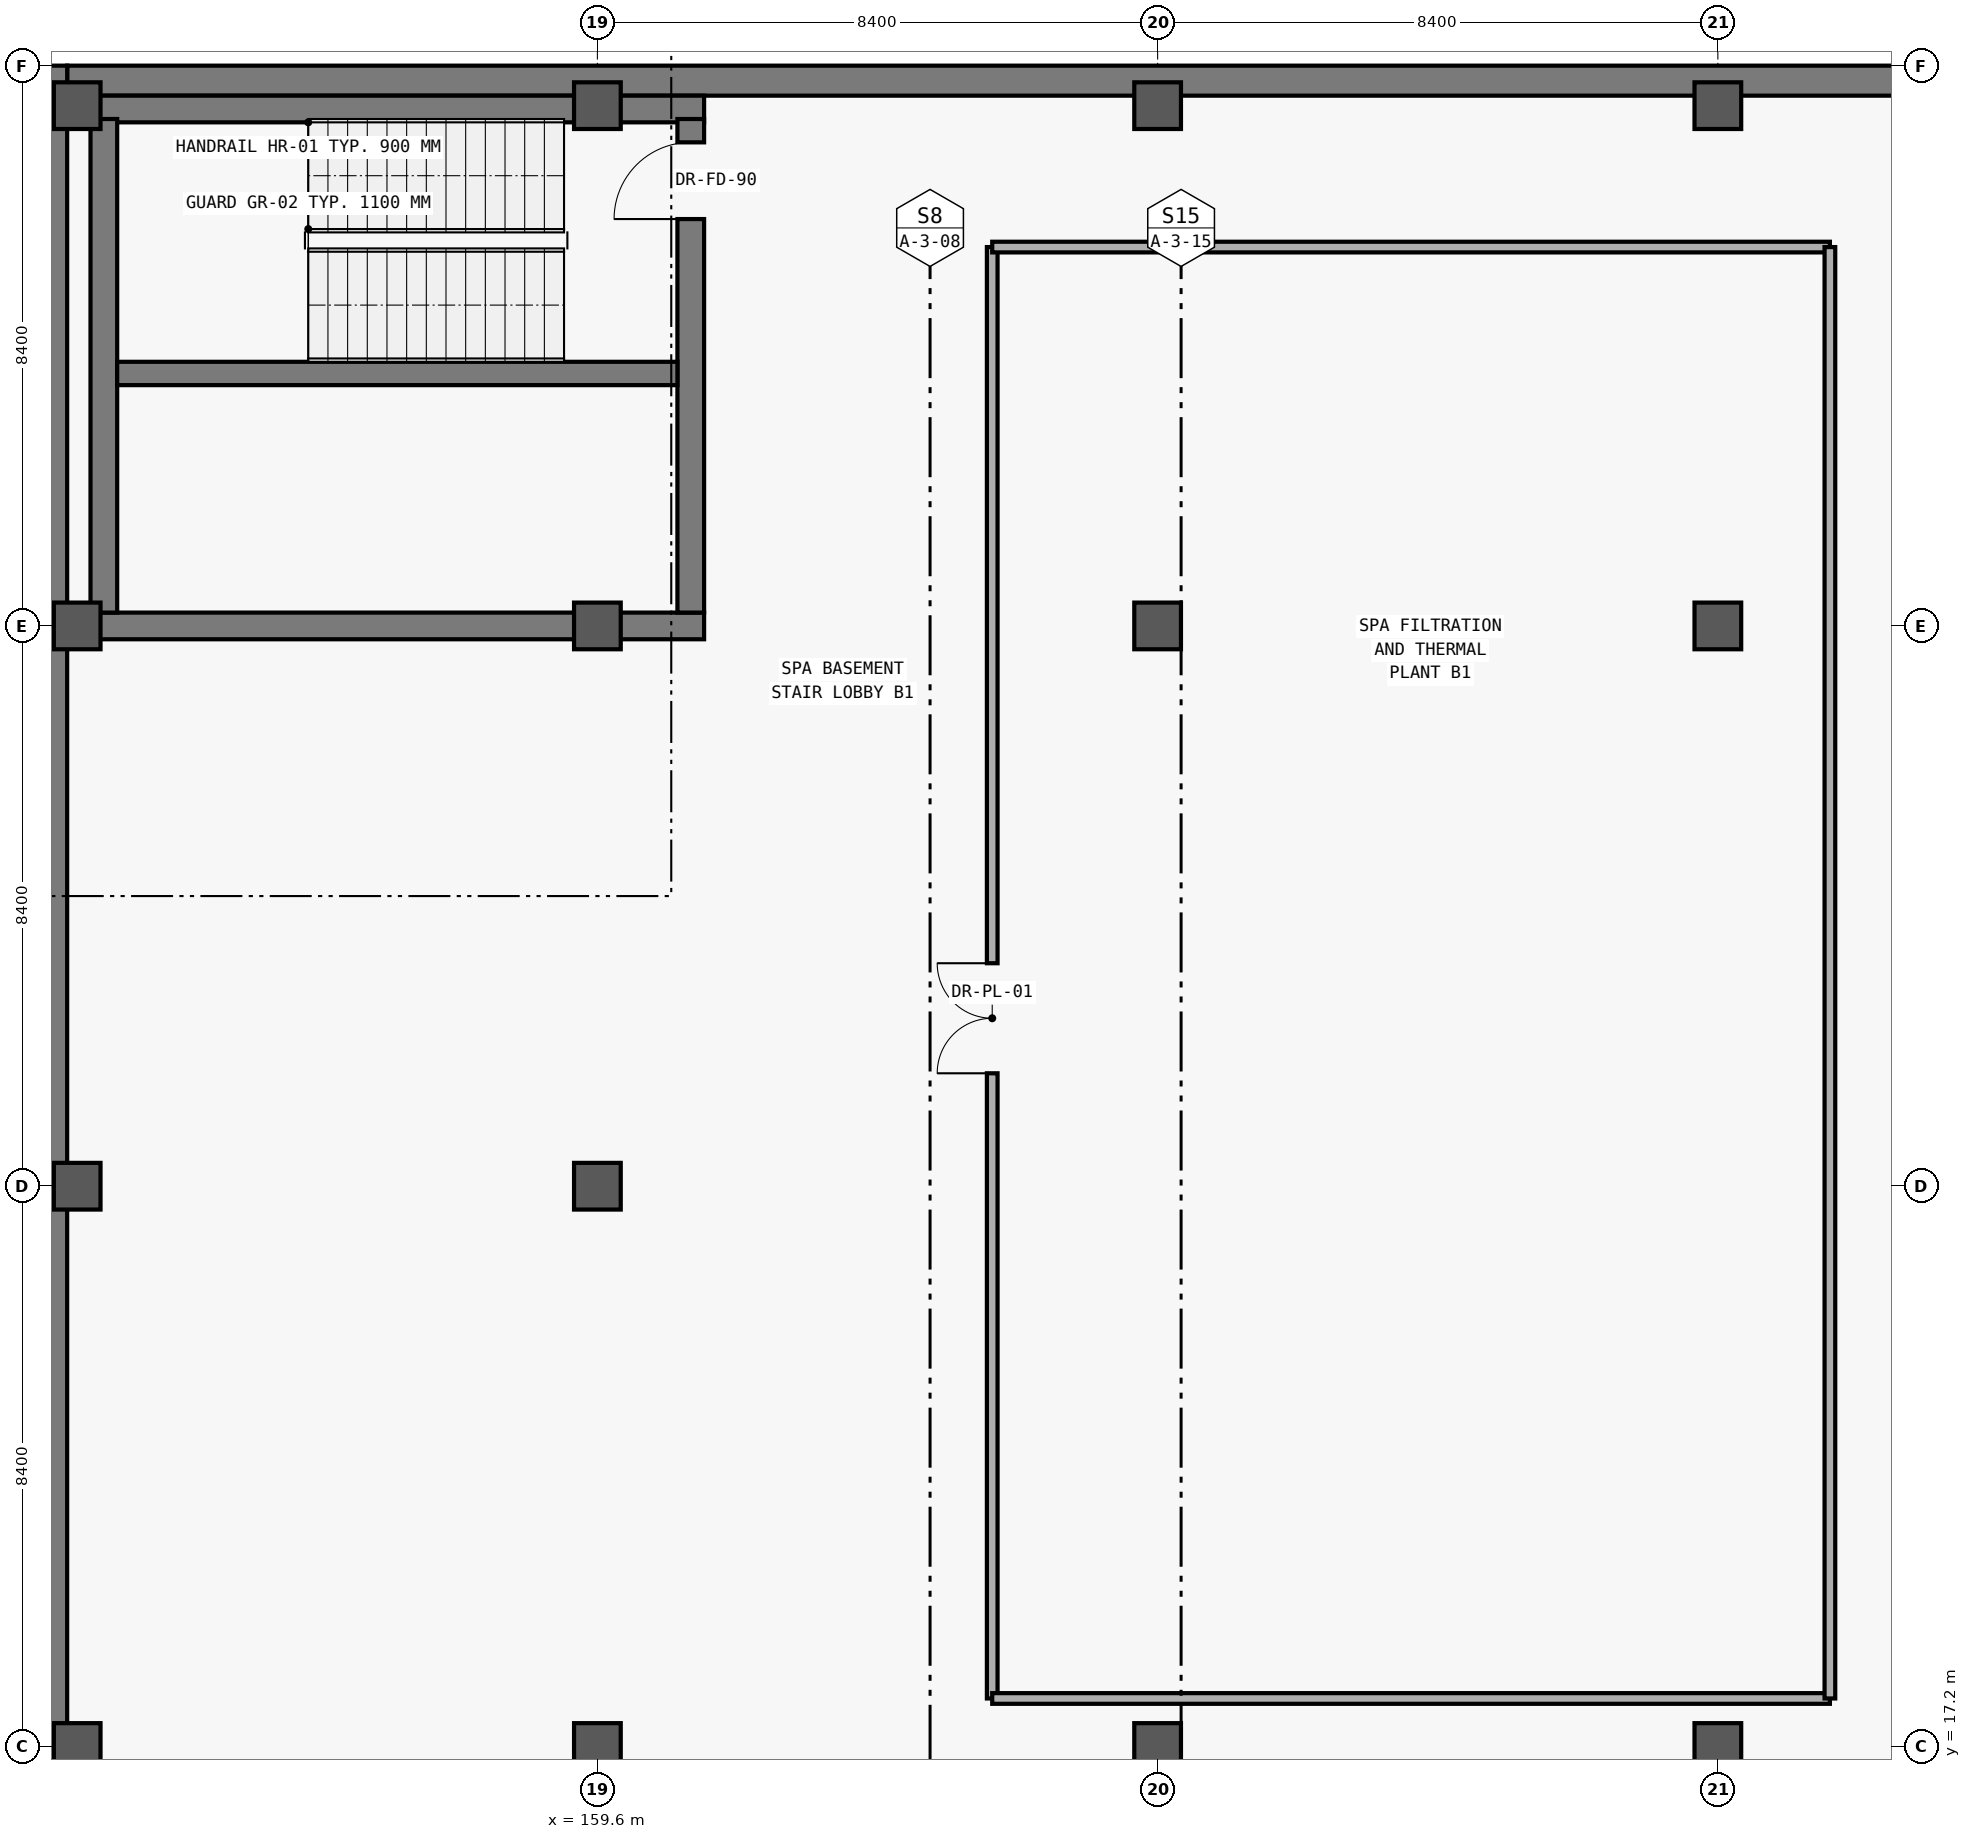
"""IFC4 building model, lengths in metres.
Left out: names, types, materials, properties, quantities, classifications, styles, units other than length and angle.
Written with IfcOpenShell. Run it as: python <this file> out.ifc"""

import sys

from ifc_helpers import new_model, si_unit, direction, frame, frame_2d, origin, origin_2d, place, context, subcontext, project, spatial, rectangle, extrude, element, fill, save


model = new_model("IFC4")
c1 = context("Model", 3, precision=1e-05, world=origin(), true_north=direction((0.0, 1.0)))
c2 = subcontext(c1, "Body", "Model", "MODEL_VIEW")
j1 = project(units=[si_unit("LENGTHUNIT", "METRE"), si_unit("PLANEANGLEUNIT", "RADIAN")], contexts=[c1])
p1 = place(None, origin())
s1 = spatial("IfcSite", under=j1, at=p1, CompositionType="ELEMENT")
p2 = place(p1, origin())
s2 = spatial("IfcBuilding", under=s1, at=p2, CompositionType="ELEMENT")
p3 = place(p2, frame((0.0, 0.0, -4.8)))
s3 = spatial("IfcBuildingStorey", under=s2, at=p3, CompositionType="ELEMENT", Elevation=-4.8)
p4 = place(p3, frame((151.65, 42.175, 0.0), z_axis=(0.0, 0.0, 1.0), x_axis=(1.0, 0.0, 0.0)))
e1 = element("IfcWall", 1, at=p4, inside=s3, PredefinedType="USERDEFINED", context=c2, shape_type="SweptSolid", body=[
    extrude(rectangle(XDim=41.1, YDim=0.45, at=frame_2d((20.55, 0.0))), origin(), (0.0, 0.0, 1.0), 4.48),
])
p5 = place(p3, frame((151.425, 6.0, 0.0), z_axis=(0.0, 0.0, 1.0), x_axis=(0.0, 1.0, 0.0)))
e2 = element("IfcWall", 2, at=p5, inside=s3, PredefinedType="USERDEFINED", context=c2, shape_type="SweptSolid", body=[
    extrude(rectangle(XDim=36.4, YDim=0.45, at=frame_2d((18.2, 0.0))), origin(), (0.0, 0.0, 1.0), 4.48),
])
for number, where, z_axis, x_axis in (
    (3, (151.8, 17.2, 0.0), (0.0, 0.0, 1.0), (1.0, 0.0, 0.0)),
    (4, (151.8, 25.6, 0.0), (0.0, 0.0, 1.0), (1.0, 0.0, 0.0)),
    (5, (151.8, 34.0, 0.0), (0.0, 0.0, 1.0), (1.0, 0.0, 0.0)),
    (6, (151.8, 41.8, 0.0), (0.0, 0.0, 1.0), (1.0, 0.0, 0.0)),
    (7, (159.6, 17.2, 0.0), (0.0, 0.0, 1.0), (1.0, 0.0, 0.0)),
    (8, (159.6, 25.6, 0.0), (0.0, 0.0, 1.0), (1.0, 0.0, 0.0)),
    (9, (159.6, 34.0, 0.0), (0.0, 0.0, 1.0), (1.0, 0.0, 0.0)),
    (10, (159.6, 41.8, 0.0), (0.0, 0.0, 1.0), (1.0, 0.0, 0.0)),
    (11, (168.0, 17.2, 0.0), (0.0, 0.0, 1.0), (1.0, 0.0, 0.0)),
    (12, (168.0, 34.0, 0.0), (0.0, 0.0, 1.0), (1.0, 0.0, 0.0)),
    (13, (168.0, 41.8, 0.0), (0.0, 0.0, 1.0), (1.0, 0.0, 0.0)),
    (14, (176.4, 17.2, 0.0), (0.0, 0.0, 1.0), (1.0, 0.0, 0.0)),
    (15, (176.4, 34.0, 0.0), (0.0, 0.0, 1.0), (1.0, 0.0, 0.0)),
    (16, (176.4, 41.8, 0.0), (0.0, 0.0, 1.0), (1.0, 0.0, 0.0)),
):
    element("IfcColumn", number, at=place(p3, frame(where, z_axis=z_axis, x_axis=x_axis)), inside=s3, PredefinedType="COLUMN", context=c2, shape_type="SweptSolid", body=[
        extrude(rectangle(XDim=0.7, YDim=0.7, at=origin_2d()), origin(), (0.0, 0.0, 1.0), 4.8),
    ])
for number, where, z_axis, x_axis in (
    (17, (152.0, 34.0, 0.0), (0.0, 0.0, 1.0), (1.0, 0.0, 0.0)),
    (18, (161.2, 41.75, 0.0), (0.0, 0.0, 1.0), (-1.0, 0.0, 0.0)),
):
    element("IfcWall", number, at=place(p3, frame(where, z_axis=z_axis, x_axis=x_axis)), inside=s3, PredefinedType="SHEAR", context=c2, shape_type="SweptSolid", body=[
        extrude(rectangle(XDim=9.2, YDim=0.4, at=frame_2d((4.6, 0.0))), origin(), (0.0, 0.0, 1.0), 4.48),
    ])
p6 = place(p3, frame((152.2, 41.6, 0.0), z_axis=(0.0, 0.0, 1.0), x_axis=(0.0, -1.0, 0.0)))
e19 = element("IfcWall", 19, at=p6, inside=s3, PredefinedType="SHEAR", context=c2, shape_type="SweptSolid", body=[
    extrude(rectangle(XDim=7.4, YDim=0.4, at=frame_2d((3.7, 0.0))), origin(), (0.0, 0.0, 1.0), 4.48),
])
p7 = place(p3, frame((161.0, 34.2, 0.0), z_axis=(0.0, 0.0, 1.0), x_axis=(0.0, 1.0, 0.0)))
e20 = element("IfcWall", 20, at=p7, inside=s3, PredefinedType="SHEAR", context=c2, shape_type="SweptSolid", body=[
    extrude(rectangle(XDim=7.4, YDim=0.4, at=frame_2d((3.7, 0.0))), origin(), (0.0, 0.0, 1.0), 4.48),
])
p8 = place(p7, frame((5.9, 0.0, 0.0)))
e21 = element("IfcOpeningElement", 21, at=p8, cuts=e20, PredefinedType="OPENING", context=c2, shape_type="SweptSolid", body=[
    extrude(rectangle(XDim=1.15, YDim=2.2, at=frame_2d((0.575, 1.1))), frame((0.0, 0.21, 0.0), z_axis=(0.0, -1.0, 0.0), x_axis=(1.0, 0.0, 0.0)), (0.0, 0.0, 1.0), 0.42),
])
p9 = place(p3, frame((152.4, 37.785, 0.0), z_axis=(0.0, 0.0, 1.0), x_axis=(1.0, 0.0, 0.0)))
e22 = element("IfcWall", 22, at=p9, inside=s3, PredefinedType="SHEAR", context=c2, shape_type="SweptSolid", body=[
    extrude(rectangle(XDim=8.4, YDim=0.35, at=frame_2d((4.2, 0.0))), origin(), (0.0, 0.0, 1.0), 4.48),
])
p10 = place(p3, frame((165.52, 17.92, 0.0), z_axis=(0.0, 0.0, 1.0), x_axis=(0.0, 1.0, 0.0)))
e23 = element("IfcWall", 23, at=p10, inside=s3, PredefinedType="PARTITIONING", context=c2, shape_type="SweptSolid", body=[
    extrude(rectangle(XDim=21.76, YDim=0.16, at=frame_2d((10.88, 0.0))), origin(), (0.0, 0.0, 1.0), 3.58),
])
p11 = place(p10, frame((9.373, 0.0, 0.0)))
e24 = element("IfcOpeningElement", 24, at=p11, cuts=e23, PredefinedType="OPENING", context=c2, shape_type="SweptSolid", body=[
    extrude(rectangle(XDim=1.65, YDim=2.35, at=frame_2d((0.825, 1.175))), frame((0.0, 0.09, 0.0), z_axis=(0.0, -1.0, 0.0), x_axis=(1.0, 0.0, 0.0)), (0.0, 0.0, 1.0), 0.18),
])
for number, where, z_axis, x_axis in (
    (25, (165.52, 17.92, 0.0), (0.0, 0.0, 1.0), (1.0, 0.0, 0.0)),
    (26, (165.52, 39.68, 0.0), (0.0, 0.0, 1.0), (1.0, 0.0, 0.0)),
):
    element("IfcWall", number, at=place(p3, frame(where, z_axis=z_axis, x_axis=x_axis)), inside=s3, PredefinedType="PARTITIONING", context=c2, shape_type="SweptSolid", body=[
        extrude(rectangle(XDim=12.56, YDim=0.16, at=frame_2d((6.28, 0.0))), origin(), (0.0, 0.0, 1.0), 3.58),
    ])
p12 = place(p3, frame((178.08, 17.92, 0.0), z_axis=(0.0, 0.0, 1.0), x_axis=(0.0, 1.0, 0.0)))
e27 = element("IfcWall", 27, at=p12, inside=s3, PredefinedType="PARTITIONING", context=c2, shape_type="SweptSolid", body=[
    extrude(rectangle(XDim=21.76, YDim=0.16, at=frame_2d((10.88, 0.0))), origin(), (0.0, 0.0, 1.0), 3.58),
])
p13 = place(p8, origin())
e28 = element("IfcDoor", 28, at=p13, inside=s3, OperationType="SINGLE_SWING_LEFT", PredefinedType="DOOR", context=c2, shape_type="SweptSolid", body=[
    extrude(rectangle(XDim=1.15, YDim=2.2, at=frame_2d((0.575, 1.1))), frame((0.0, 0.025, 0.0), z_axis=(0.0, -1.0, 0.0), x_axis=(1.0, 0.0, 0.0)), (0.0, 0.0, 1.0), 0.05),
])
fill(e21, e28)
p14 = place(p11, origin())
e29 = element("IfcDoor", 29, at=p14, inside=s3, OperationType="DOUBLE_DOOR_SINGLE_SWING", PredefinedType="DOOR", context=c2, shape_type="SweptSolid", body=[
    extrude(rectangle(XDim=1.65, YDim=2.35, at=frame_2d((0.825, 1.175))), frame((0.0, 0.025, 0.0), z_axis=(0.0, -1.0, 0.0), x_axis=(1.0, 0.0, 0.0)), (0.0, 0.0, 1.0), 0.05),
])
fill(e24, e29)
save(model, sys.argv[1])
